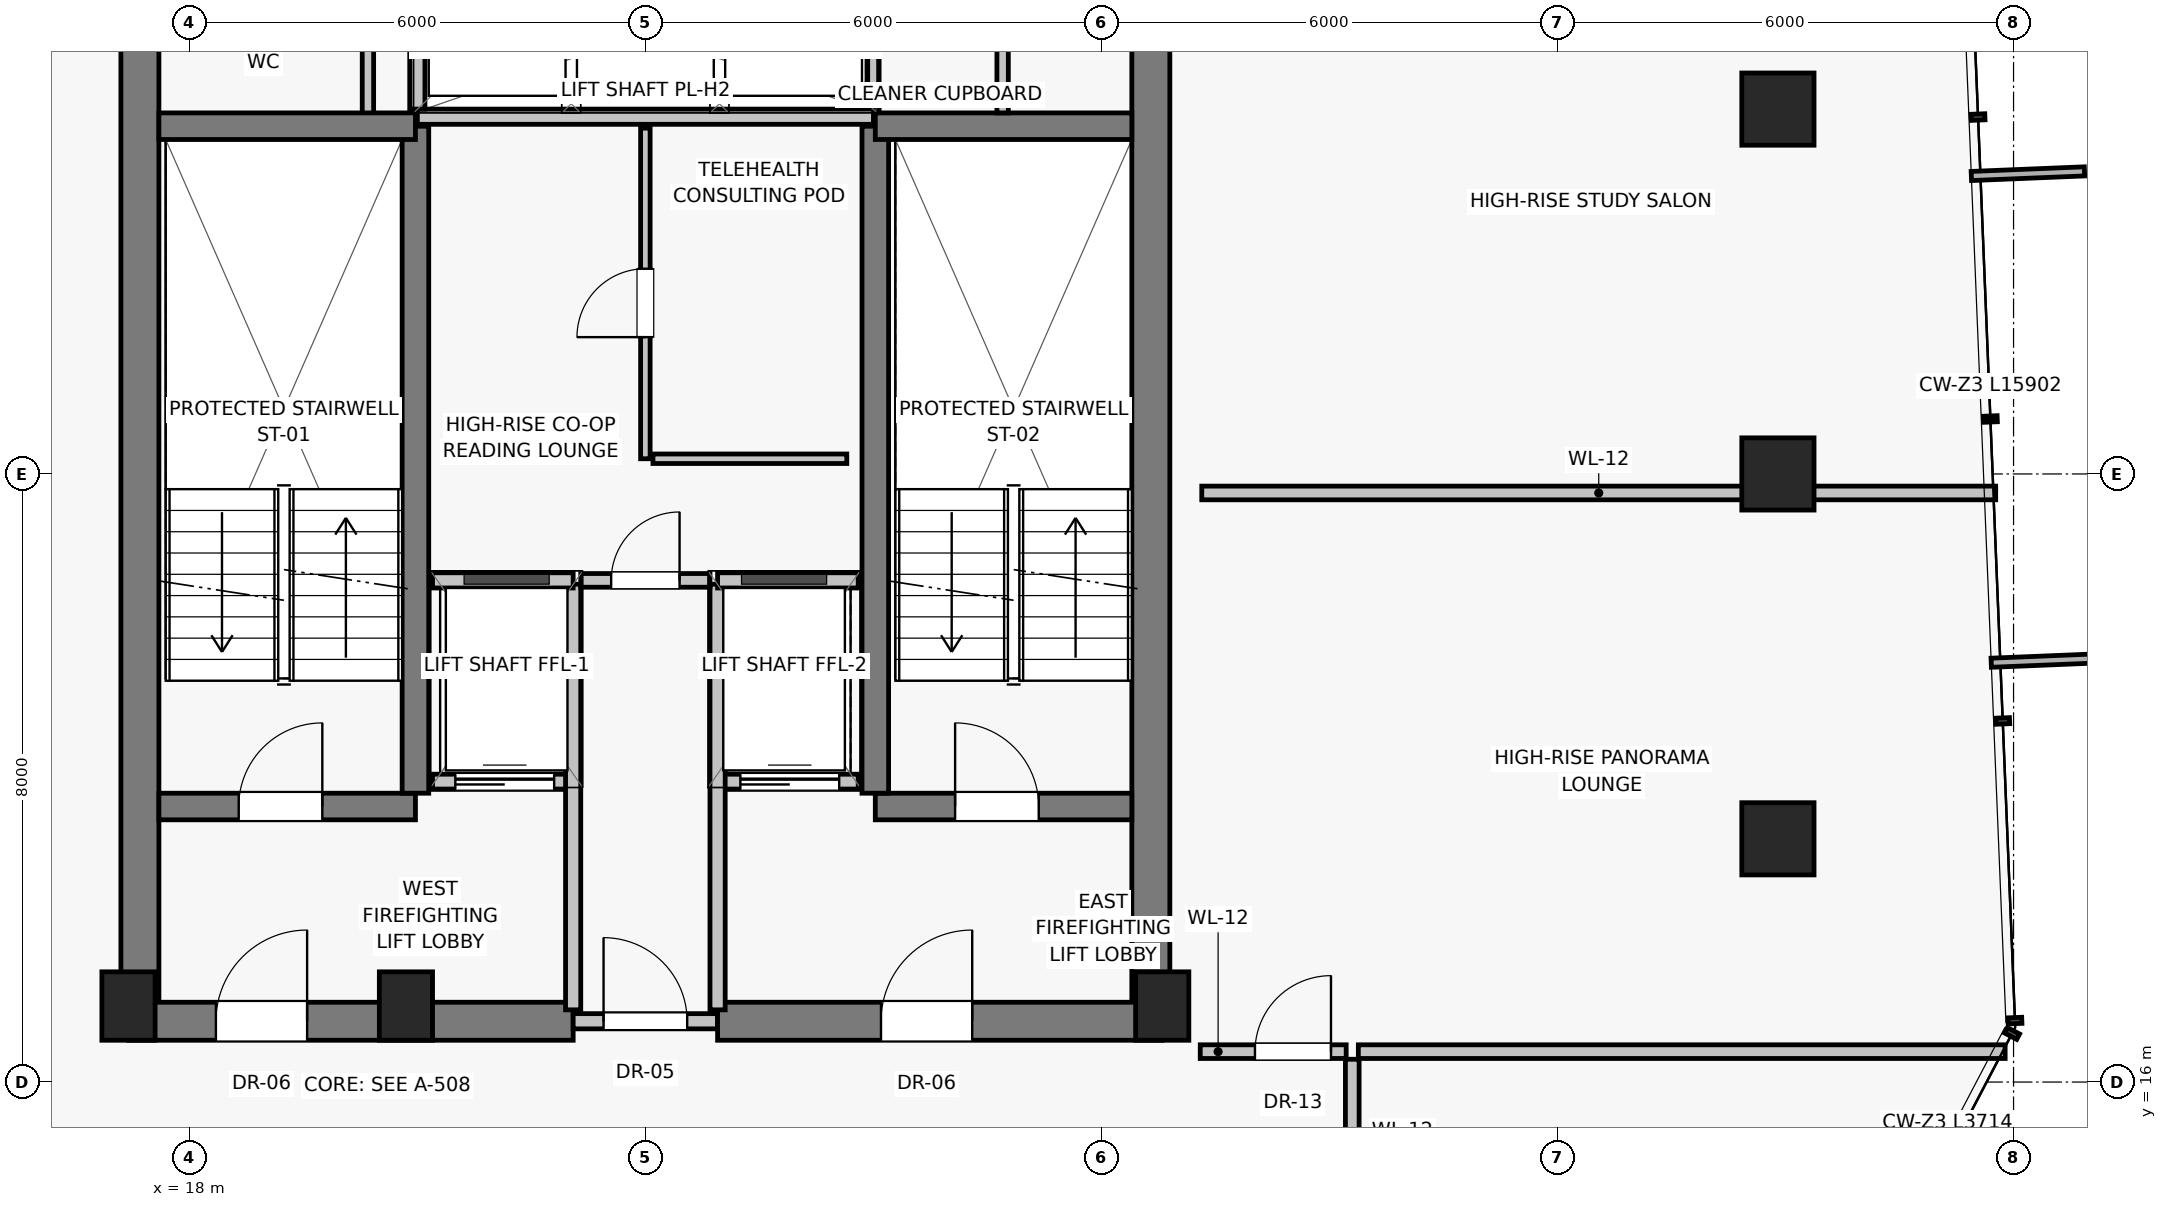
"""IFC4 building model, lengths in metres.
Left out: names, types, materials, properties, quantities, classifications, styles, units other than length and angle.
Written with IfcOpenShell. Run it as: python <this file> out.ifc"""

import sys

from ifc_helpers import new_model, si_unit, direction, frame, frame_2d, origin, origin_2d, place, context, subcontext, project, spatial, rectangle, extrude, source, transform, mapped, element, fill, save


model = new_model("IFC4")
c1 = context("Model", 3, precision=1e-05, world=origin(), true_north=direction((0.0, 1.0)))
c2 = subcontext(c1, "Body", "Model", "MODEL_VIEW")
j1 = project(units=[si_unit("LENGTHUNIT", "METRE"), si_unit("PLANEANGLEUNIT", "RADIAN")], contexts=[c1])
p1 = place(None, origin())
s1 = spatial("IfcSite", under=j1, at=p1, CompositionType="ELEMENT")
p2 = place(p1, origin())
s2 = spatial("IfcBuilding", under=s1, at=p2, CompositionType="ELEMENT")
p3 = place(p2, frame((0.0, 0.0, 198.35)))
s3 = spatial("IfcBuildingStorey", under=s2, at=p3, CompositionType="ELEMENT", Elevation=198.35)
for number, where, z_axis, x_axis in (
    (1, (17.2, 17.0, 0.0), (0.0, 0.0, 1.0), (1.0, 0.0, 0.0)),
    (2, (20.85, 17.0, 0.0), (0.0, 0.0, 1.0), (1.0, 0.0, 0.0)),
    (3, (30.8, 17.0, 0.0), (0.0, 0.0, 1.0), (1.0, 0.0, 0.0)),
):
    element("IfcColumn", number, at=place(p3, frame(where, z_axis=z_axis, x_axis=x_axis)), inside=s3, PredefinedType="PILASTER", context=c2, shape_type="SweptSolid", body=[
        extrude(rectangle(XDim=0.7, YDim=0.9, at=origin_2d()), origin(), (0.0, 0.0, 1.0), 3.25),
    ])
for number, where, z_axis, x_axis in (
    (4, (38.9, 19.2, 0.0), (0.0, 0.0, 1.0), (1.0, 0.0, 0.0)),
    (5, (38.9, 24.0, 0.0), (0.0, 0.0, 1.0), (1.0, 0.0, 0.0)),
    (6, (38.9, 28.8, 0.0), (0.0, 0.0, 1.0), (1.0, 0.0, 0.0)),
):
    element("IfcColumn", number, at=place(p3, frame(where, z_axis=z_axis, x_axis=x_axis)), inside=s3, PredefinedType="COLUMN", context=c2, shape_type="SweptSolid", body=[
        extrude(rectangle(XDim=0.95, YDim=0.95, at=origin_2d()), origin(), (0.0, 0.0, 1.0), 3.25),
    ])
for number, where, z_axis, x_axis in (
    (7, (17.35, 16.8, 0.0), (0.0, 0.0, 1.0), (0.0, 1.0, 0.0)),
    (8, (30.65, 16.8, 0.0), (0.0, 0.0, 1.0), (0.0, 1.0, 0.0)),
):
    element("IfcWall", number, at=place(p3, frame(where, z_axis=z_axis, x_axis=x_axis)), inside=s3, PredefinedType="SHEAR", context=c2, shape_type="SweptSolid", body=[
        extrude(rectangle(XDim=14.2, YDim=0.5, at=frame_2d((7.1, 0.0))), origin(), (0.0, 0.0, 1.0), 3.015),
    ])
p4 = place(p3, frame((17.2, 16.8, 0.0), z_axis=(0.0, 0.0, 1.0), x_axis=(1.0, 0.0, 0.0)))
e9 = element("IfcWall", 9, at=p4, inside=s3, PredefinedType="SHEAR", context=c2, shape_type="SweptSolid", body=[
    extrude(rectangle(XDim=5.85, YDim=0.5, at=frame_2d((2.925, 0.0))), origin(), (0.0, 0.0, 1.0), 3.015),
])
p5 = place(p4, frame((1.15, 0.0, 0.0)))
e10 = element("IfcOpeningElement", 10, at=p5, cuts=e9, PredefinedType="OPENING", context=c2, shape_type="SweptSolid", body=[
    extrude(rectangle(XDim=1.2, YDim=2.03, at=frame_2d((0.6, 1.015))), frame((0.0, 0.26, 0.0), z_axis=(0.0, -1.0, 0.0), x_axis=(1.0, 0.0, 0.0)), (0.0, 0.0, 1.0), 0.52),
])
p6 = place(p3, frame((23.05, 16.8, 0.0), z_axis=(0.0, 0.0, 1.0), x_axis=(1.0, 0.0, 0.0)))
e11 = element("IfcWall", 11, at=p6, inside=s3, PredefinedType="SOLIDWALL", context=c2, shape_type="SweptSolid", body=[
    extrude(rectangle(XDim=1.9, YDim=0.2, at=frame_2d((0.95, 0.0))), origin(), (0.0, 0.0, 1.0), 2.165),
])
p7 = place(p6, frame((0.4, 0.0, 0.0)))
e12 = element("IfcOpeningElement", 12, at=p7, cuts=e11, PredefinedType="OPENING", context=c2, shape_type="SweptSolid", body=[
    extrude(rectangle(XDim=1.1, YDim=2.03, at=frame_2d((0.55, 1.015))), frame((0.0, 0.11, 0.0), z_axis=(0.0, -1.0, 0.0), x_axis=(1.0, 0.0, 0.0)), (0.0, 0.0, 1.0), 0.22),
])
p8 = place(p3, frame((24.95, 16.8, 0.0), z_axis=(0.0, 0.0, 1.0), x_axis=(1.0, 0.0, 0.0)))
e13 = element("IfcWall", 13, at=p8, inside=s3, PredefinedType="SHEAR", context=c2, shape_type="SweptSolid", body=[
    extrude(rectangle(XDim=5.85, YDim=0.5, at=frame_2d((2.925, 0.0))), origin(), (0.0, 0.0, 1.0), 3.015),
])
p9 = place(p8, frame((2.15, 0.0, 0.0)))
e14 = element("IfcOpeningElement", 14, at=p9, cuts=e13, PredefinedType="OPENING", context=c2, shape_type="SweptSolid", body=[
    extrude(rectangle(XDim=1.2, YDim=2.03, at=frame_2d((0.6, 1.015))), frame((0.0, 0.26, 0.0), z_axis=(0.0, -1.0, 0.0), x_axis=(1.0, 0.0, 0.0)), (0.0, 0.0, 1.0), 0.52),
])
for number, where, z_axis, x_axis in (
    (15, (20.35, 28.65, 0.0), (0.0, 0.0, 1.0), (0.0, 1.0, 0.0)),
    (16, (27.0, 28.65, 0.0), (0.0, 0.0, 1.0), (0.0, 1.0, 0.0)),
):
    element("IfcWall", number, at=place(p3, frame(where, z_axis=z_axis, x_axis=x_axis)), inside=s3, PredefinedType="PARTITIONING", context=c2, shape_type="SweptSolid", body=[
        extrude(rectangle(XDim=2.2, YDim=0.15, at=frame_2d((1.1, 0.0))), origin(), (0.0, 0.0, 1.0), 3.015),
    ])
p10 = place(p3, frame((17.6, 19.625, 0.0), z_axis=(0.0, 0.0, 1.0), x_axis=(1.0, 0.0, 0.0)))
e17 = element("IfcWall", 17, at=p10, inside=s3, PredefinedType="SHEAR", context=c2, shape_type="SweptSolid", body=[
    extrude(rectangle(XDim=3.375, YDim=0.35, at=frame_2d((1.688, 0.0))), origin(), (0.0, 0.0, 1.0), 3.015),
])
p11 = place(p10, frame((1.05, 0.0, 0.0)))
e18 = element("IfcOpeningElement", 18, at=p11, cuts=e17, PredefinedType="OPENING", context=c2, shape_type="SweptSolid", body=[
    extrude(rectangle(XDim=1.1, YDim=2.03, at=frame_2d((0.55, 1.015))), frame((0.0, 0.185, 0.0), z_axis=(0.0, -1.0, 0.0), x_axis=(1.0, 0.0, 0.0)), (0.0, 0.0, 1.0), 0.37),
])
p12 = place(p3, frame((21.2, 19.95, 0.0), z_axis=(0.0, 0.0, 1.0), x_axis=(1.0, 0.0, 0.0)))
e19 = element("IfcWall", 19, at=p12, inside=s3, PredefinedType="SOLIDWALL", context=c2, shape_type="SweptSolid", body=[
    extrude(rectangle(XDim=1.85, YDim=0.2, at=frame_2d((0.925, 0.0))), origin(), (0.0, 0.0, 1.0), 3.015),
])
p13 = place(p12, frame((0.3, 0.0, 0.0)))
e20 = element("IfcOpeningElement", 20, at=p13, cuts=e19, PredefinedType="OPENING", context=c2, shape_type="SweptSolid", body=[
    extrude(rectangle(XDim=1.3, YDim=2.25, at=frame_2d((0.65, 1.125))), frame((0.0, 0.11, 0.0), z_axis=(0.0, -1.0, 0.0), x_axis=(1.0, 0.0, 0.0)), (0.0, 0.0, 1.0), 0.22),
])
p14 = place(p3, frame((24.95, 19.95, 0.0), z_axis=(0.0, 0.0, 1.0), x_axis=(1.0, 0.0, 0.0)))
e21 = element("IfcWall", 21, at=p14, inside=s3, PredefinedType="SOLIDWALL", context=c2, shape_type="SweptSolid", body=[
    extrude(rectangle(XDim=1.85, YDim=0.2, at=frame_2d((0.925, 0.0))), origin(), (0.0, 0.0, 1.0), 3.015),
])
p15 = place(p14, frame((0.3, 0.0, 0.0)))
e22 = element("IfcOpeningElement", 22, at=p15, cuts=e21, PredefinedType="OPENING", context=c2, shape_type="SweptSolid", body=[
    extrude(rectangle(XDim=1.3, YDim=2.25, at=frame_2d((0.65, 1.125))), frame((0.0, 0.11, 0.0), z_axis=(0.0, -1.0, 0.0), x_axis=(1.0, 0.0, 0.0)), (0.0, 0.0, 1.0), 0.22),
])
p16 = place(p3, frame((27.025, 19.625, 0.0), z_axis=(0.0, 0.0, 1.0), x_axis=(1.0, 0.0, 0.0)))
e23 = element("IfcWall", 23, at=p16, inside=s3, PredefinedType="SHEAR", context=c2, shape_type="SweptSolid", body=[
    extrude(rectangle(XDim=3.375, YDim=0.35, at=frame_2d((1.688, 0.0))), origin(), (0.0, 0.0, 1.0), 3.015),
])
p17 = place(p16, frame((1.05, 0.0, 0.0)))
e24 = element("IfcOpeningElement", 24, at=p17, cuts=e23, PredefinedType="OPENING", context=c2, shape_type="SweptSolid", body=[
    extrude(rectangle(XDim=1.1, YDim=2.03, at=frame_2d((0.55, 1.015))), frame((0.0, 0.185, 0.0), z_axis=(0.0, -1.0, 0.0), x_axis=(1.0, 0.0, 0.0)), (0.0, 0.0, 1.0), 0.37),
])
for number, where, z_axis, x_axis in (
    (25, (20.975, 19.8, 0.0), (0.0, 0.0, 1.0), (0.0, 1.0, 0.0)),
    (26, (27.025, 19.8, 0.0), (0.0, 0.0, 1.0), (0.0, 1.0, 0.0)),
):
    element("IfcWall", number, at=place(p3, frame(where, z_axis=z_axis, x_axis=x_axis)), inside=s3, PredefinedType="SHEAR", context=c2, shape_type="SweptSolid", body=[
        extrude(rectangle(XDim=8.775, YDim=0.35, at=frame_2d((4.387, 0.0))), origin(), (0.0, 0.0, 1.0), 3.015),
    ])
for number, where, z_axis, x_axis in (
    (27, (17.6, 28.575, 0.0), (0.0, 0.0, 1.0), (1.0, 0.0, 0.0)),
    (28, (27.025, 28.575, 0.0), (0.0, 0.0, 1.0), (1.0, 0.0, 0.0)),
):
    element("IfcWall", number, at=place(p3, frame(where, z_axis=z_axis, x_axis=x_axis)), inside=s3, PredefinedType="SHEAR", context=c2, shape_type="SweptSolid", body=[
        extrude(rectangle(XDim=3.375, YDim=0.35, at=frame_2d((1.688, 0.0))), origin(), (0.0, 0.0, 1.0), 3.015),
    ])
for number, where, z_axis, x_axis in (
    (29, (23.05, 16.95, 0.0), (0.0, 0.0, 1.0), (0.0, 1.0, 0.0)),
    (30, (24.95, 16.95, 0.0), (0.0, 0.0, 1.0), (0.0, 1.0, 0.0)),
):
    element("IfcWall", number, at=place(p3, frame(where, z_axis=z_axis, x_axis=x_axis)), inside=s3, PredefinedType="SOLIDWALL", context=c2, shape_type="SweptSolid", body=[
        extrude(rectangle(XDim=5.6, YDim=0.2, at=frame_2d((2.8, 0.0))), origin(), (0.0, 0.0, 1.0), 3.015),
    ])
for number, where, z_axis, x_axis in (
    (31, (21.2, 22.6, 0.0), (0.0, 0.0, 1.0), (1.0, 0.0, 0.0)),
    (32, (24.95, 22.6, 0.0), (0.0, 0.0, 1.0), (1.0, 0.0, 0.0)),
):
    element("IfcWall", number, at=place(p3, frame(where, z_axis=z_axis, x_axis=x_axis)), inside=s3, PredefinedType="SOLIDWALL", context=c2, shape_type="SweptSolid", body=[
        extrude(rectangle(XDim=1.85, YDim=0.2, at=frame_2d((0.925, 0.0))), origin(), (0.0, 0.0, 1.0), 3.015),
    ])
p18 = place(p3, frame((21.0, 28.7, 0.0), z_axis=(0.0, 0.0, 1.0), x_axis=(1.0, 0.0, 0.0)))
e33 = element("IfcWall", 33, at=p18, inside=s3, PredefinedType="SOLIDWALL", context=c2, shape_type="SweptSolid", body=[
    extrude(rectangle(XDim=6.0, YDim=0.2, at=frame_2d((3.0, 0.0))), origin(), (0.0, 0.0, 1.0), 3.015),
])
p19 = place(p3, frame((21.0, 28.8, 0.0), z_axis=(0.0, 0.0, 1.0), x_axis=(0.0, 1.0, 0.0)))
e34 = element("IfcWall", 34, at=p19, inside=s3, PredefinedType="SOLIDWALL", context=c2, shape_type="SweptSolid", body=[
    extrude(rectangle(XDim=1.6, YDim=0.2, at=frame_2d((0.8, 0.0))), origin(), (0.0, 0.0, 1.0), 3.015),
])
p20 = place(p3, frame((23.15, 22.6, 0.0), z_axis=(0.0, 0.0, 1.0), x_axis=(1.0, 0.0, 0.0)))
e35 = element("IfcWall", 35, at=p20, inside=s3, PredefinedType="PARTITIONING", context=c2, shape_type="SweptSolid", body=[
    extrude(rectangle(XDim=1.7, YDim=0.18, at=frame_2d((0.85, 0.0))), origin(), (0.0, 0.0, 1.0), 3.015),
])
p21 = place(p20, frame((0.4, 0.0, 0.0)))
e36 = element("IfcOpeningElement", 36, at=p21, cuts=e35, PredefinedType="OPENING", context=c2, shape_type="SweptSolid", body=[
    extrude(rectangle(XDim=0.9, YDim=2.01, at=frame_2d((0.45, 1.005))), frame((0.0, 0.1, 0.0), z_axis=(0.0, -1.0, 0.0), x_axis=(1.0, 0.0, 0.0)), (0.0, 0.0, 1.0), 0.2),
])
p22 = place(p3, frame((24.1, 24.2, 0.0), z_axis=(0.0, 0.0, 1.0), x_axis=(1.0, 0.0, 0.0)))
e37 = element("IfcWall", 37, at=p22, inside=s3, PredefinedType="PARTITIONING", context=c2, shape_type="SweptSolid", body=[
    extrude(rectangle(XDim=2.55, YDim=0.125, at=frame_2d((1.275, 0.0))), origin(), (0.0, 0.0, 1.0), 3.015),
])
p23 = place(p3, frame((24.0, 24.2, 0.0), z_axis=(0.0, 0.0, 1.0), x_axis=(0.0, 1.0, 0.0)))
e38 = element("IfcWall", 38, at=p23, inside=s3, PredefinedType="PARTITIONING", context=c2, shape_type="SweptSolid", body=[
    extrude(rectangle(XDim=4.35, YDim=0.125, at=frame_2d((2.175, 0.0))), origin(), (0.0, 0.0, 1.0), 3.015),
])
p24 = place(p23, frame((1.6, 0.0, 0.0)))
e39 = element("IfcOpeningElement", 39, at=p24, cuts=e38, PredefinedType="OPENING", context=c2, shape_type="SweptSolid", body=[
    extrude(rectangle(XDim=0.9, YDim=2.01, at=frame_2d((0.45, 1.005))), frame((0.0, 0.073, 0.0), z_axis=(0.0, -1.0, 0.0), x_axis=(1.0, 0.0, 0.0)), (0.0, 0.0, 1.0), 0.145),
])
p25 = place(p3, frame((28.7, 28.75, 0.0), z_axis=(0.0, 0.0, 1.0), x_axis=(0.0, 1.0, 0.0)))
e40 = element("IfcWall", 40, at=p25, inside=s3, PredefinedType="PARTITIONING", context=c2, shape_type="SweptSolid", body=[
    extrude(rectangle(XDim=2.0, YDim=0.15, at=frame_2d((1.0, 0.0))), origin(), (0.0, 0.0, 1.0), 3.015),
])
p26 = place(p3, frame((31.32, 23.75, 0.0), z_axis=(0.0, 0.0, 1.0), x_axis=(1.0, 0.0, 0.0)))
e41 = element("IfcWall", 41, at=p26, inside=s3, PredefinedType="PARTITIONING", context=c2, shape_type="SweptSolid", body=[
    extrude(rectangle(XDim=10.445, YDim=0.18, at=frame_2d((5.223, 0.0))), origin(), (0.0, 0.0, 1.0), 3.015),
])
p27 = place(p3, frame((33.3, 14.4, 0.0), z_axis=(0.0, 0.0, 1.0), x_axis=(0.0, 1.0, 0.0)))
e42 = element("IfcWall", 42, at=p27, inside=s3, PredefinedType="PARTITIONING", context=c2, shape_type="SweptSolid", body=[
    extrude(rectangle(XDim=1.9, YDim=0.18, at=frame_2d((0.95, 0.0))), origin(), (0.0, 0.0, 1.0), 3.015),
])
p28 = place(p3, frame((31.3, 16.4, 0.0), z_axis=(0.0, 0.0, 1.0), x_axis=(1.0, 0.0, 0.0)))
e43 = element("IfcWall", 43, at=p28, inside=s3, PredefinedType="PARTITIONING", context=c2, shape_type="SweptSolid", body=[
    extrude(rectangle(XDim=1.92, YDim=0.18, at=frame_2d((0.96, 0.0))), origin(), (0.0, 0.0, 1.0), 3.015),
])
p29 = place(p28, frame((0.72, 0.0, 0.0)))
e44 = element("IfcOpeningElement", 44, at=p29, cuts=e43, PredefinedType="OPENING", context=c2, shape_type="SweptSolid", body=[
    extrude(rectangle(XDim=1.0, YDim=2.01, at=frame_2d((0.5, 1.005))), frame((0.0, 0.1, 0.0), z_axis=(0.0, -1.0, 0.0), x_axis=(1.0, 0.0, 0.0)), (0.0, 0.0, 1.0), 0.2),
])
p30 = place(p3, frame((33.38, 16.4, 0.0), z_axis=(0.0, 0.0, 1.0), x_axis=(1.0, 0.0, 0.0)))
e45 = element("IfcWall", 45, at=p30, inside=s3, PredefinedType="PARTITIONING", context=c2, shape_type="SweptSolid", body=[
    extrude(rectangle(XDim=8.51, YDim=0.18, at=frame_2d((4.255, 0.0))), origin(), (0.0, 0.0, 1.0), 3.015),
])
m1 = source(origin(), c2, "Body", "SweptSolid", [
    extrude(rectangle(XDim=1.2, YDim=2.03, at=frame_2d((0.6, 1.015))), frame((0.0, 0.025, 0.0), z_axis=(0.0, -1.0, 0.0), x_axis=(1.0, 0.0, 0.0)), (0.0, 0.0, 1.0), 0.05),
])
p31 = place(p5, origin())
e46 = element("IfcDoor", 46, at=p31, inside=s3, OperationType="SINGLE_SWING_RIGHT", PredefinedType="DOOR", context=c2, shape_type="MappedRepresentation", body=[
    mapped(m1, transform((0.0, 0.0, 0.0), scale=1.0)),
])
fill(e10, e46)
m2 = source(origin(), c2, "Body", "SweptSolid", [
    extrude(rectangle(XDim=1.1, YDim=2.03, at=frame_2d((0.55, 1.015))), frame((0.0, 0.025, 0.0), z_axis=(0.0, -1.0, 0.0), x_axis=(1.0, 0.0, 0.0)), (0.0, 0.0, 1.0), 0.05),
])
p32 = place(p7, origin())
e47 = element("IfcDoor", 47, at=p32, inside=s3, OperationType="SINGLE_SWING_LEFT", PredefinedType="DOOR", context=c2, shape_type="MappedRepresentation", body=[
    mapped(m2, transform((0.0, 0.0, 0.0), scale=1.0)),
])
fill(e12, e47)
p33 = place(p9, origin())
e48 = element("IfcDoor", 48, at=p33, inside=s3, OperationType="SINGLE_SWING_RIGHT", PredefinedType="DOOR", context=c2, shape_type="MappedRepresentation", body=[
    mapped(m1, transform((0.0, 0.0, 0.0), scale=1.0)),
])
fill(e14, e48)
p34 = place(p11, origin())
e49 = element("IfcDoor", 49, at=p34, inside=s3, OperationType="SINGLE_SWING_RIGHT", PredefinedType="DOOR", context=c2, shape_type="MappedRepresentation", body=[
    mapped(m2, transform((0.0, 0.0, 0.0), scale=1.0)),
])
fill(e18, e49)
m3 = source(origin(), c2, "Body", "SweptSolid", [
    extrude(rectangle(XDim=1.3, YDim=2.25, at=frame_2d((0.65, 1.125))), frame((0.0, 0.025, 0.0), z_axis=(0.0, -1.0, 0.0), x_axis=(1.0, 0.0, 0.0)), (0.0, 0.0, 1.0), 0.05),
])
p35 = place(p13, origin())
e50 = element("IfcDoor", 50, at=p35, inside=s3, OperationType="SLIDING_TO_LEFT", PredefinedType="DOOR", context=c2, shape_type="MappedRepresentation", body=[
    mapped(m3, transform((0.0, 0.0, 0.0), scale=1.0)),
])
fill(e20, e50)
p36 = place(p15, origin())
e51 = element("IfcDoor", 51, at=p36, inside=s3, OperationType="SLIDING_TO_LEFT", PredefinedType="DOOR", context=c2, shape_type="MappedRepresentation", body=[
    mapped(m3, transform((0.0, 0.0, 0.0), scale=1.0)),
])
fill(e22, e51)
p37 = place(p17, origin())
e52 = element("IfcDoor", 52, at=p37, inside=s3, OperationType="SINGLE_SWING_LEFT", PredefinedType="DOOR", context=c2, shape_type="MappedRepresentation", body=[
    mapped(m2, transform((0.0, 0.0, 0.0), scale=1.0)),
])
fill(e24, e52)
m4 = source(origin(), c2, "Body", "SweptSolid", [
    extrude(rectangle(XDim=0.9, YDim=2.01, at=frame_2d((0.45, 1.005))), frame((0.0, 0.025, 0.0), z_axis=(0.0, -1.0, 0.0), x_axis=(1.0, 0.0, 0.0)), (0.0, 0.0, 1.0), 0.05),
])
p38 = place(p21, origin())
e53 = element("IfcDoor", 53, at=p38, inside=s3, OperationType="SINGLE_SWING_RIGHT", PredefinedType="DOOR", context=c2, shape_type="MappedRepresentation", body=[
    mapped(m4, transform((0.0, 0.0, 0.0), scale=1.0)),
])
fill(e36, e53)
p39 = place(p24, origin())
e54 = element("IfcDoor", 54, at=p39, inside=s3, OperationType="SINGLE_SWING_LEFT", PredefinedType="DOOR", context=c2, shape_type="MappedRepresentation", body=[
    mapped(m4, transform((0.0, 0.0, 0.0), scale=1.0)),
])
fill(e39, e54)
m5 = source(origin(), c2, "Body", "SweptSolid", [
    extrude(rectangle(XDim=1.0, YDim=2.01, at=frame_2d((0.5, 1.005))), frame((0.0, 0.025, 0.0), z_axis=(0.0, -1.0, 0.0), x_axis=(1.0, 0.0, 0.0)), (0.0, 0.0, 1.0), 0.05),
])
p40 = place(p29, origin())
e55 = element("IfcDoor", 55, at=p40, inside=s3, OperationType="SINGLE_SWING_RIGHT", PredefinedType="DOOR", context=c2, shape_type="MappedRepresentation", body=[
    mapped(m5, transform((0.0, 0.0, 0.0), scale=1.0)),
])
fill(e44, e55)
save(model, sys.argv[1])
